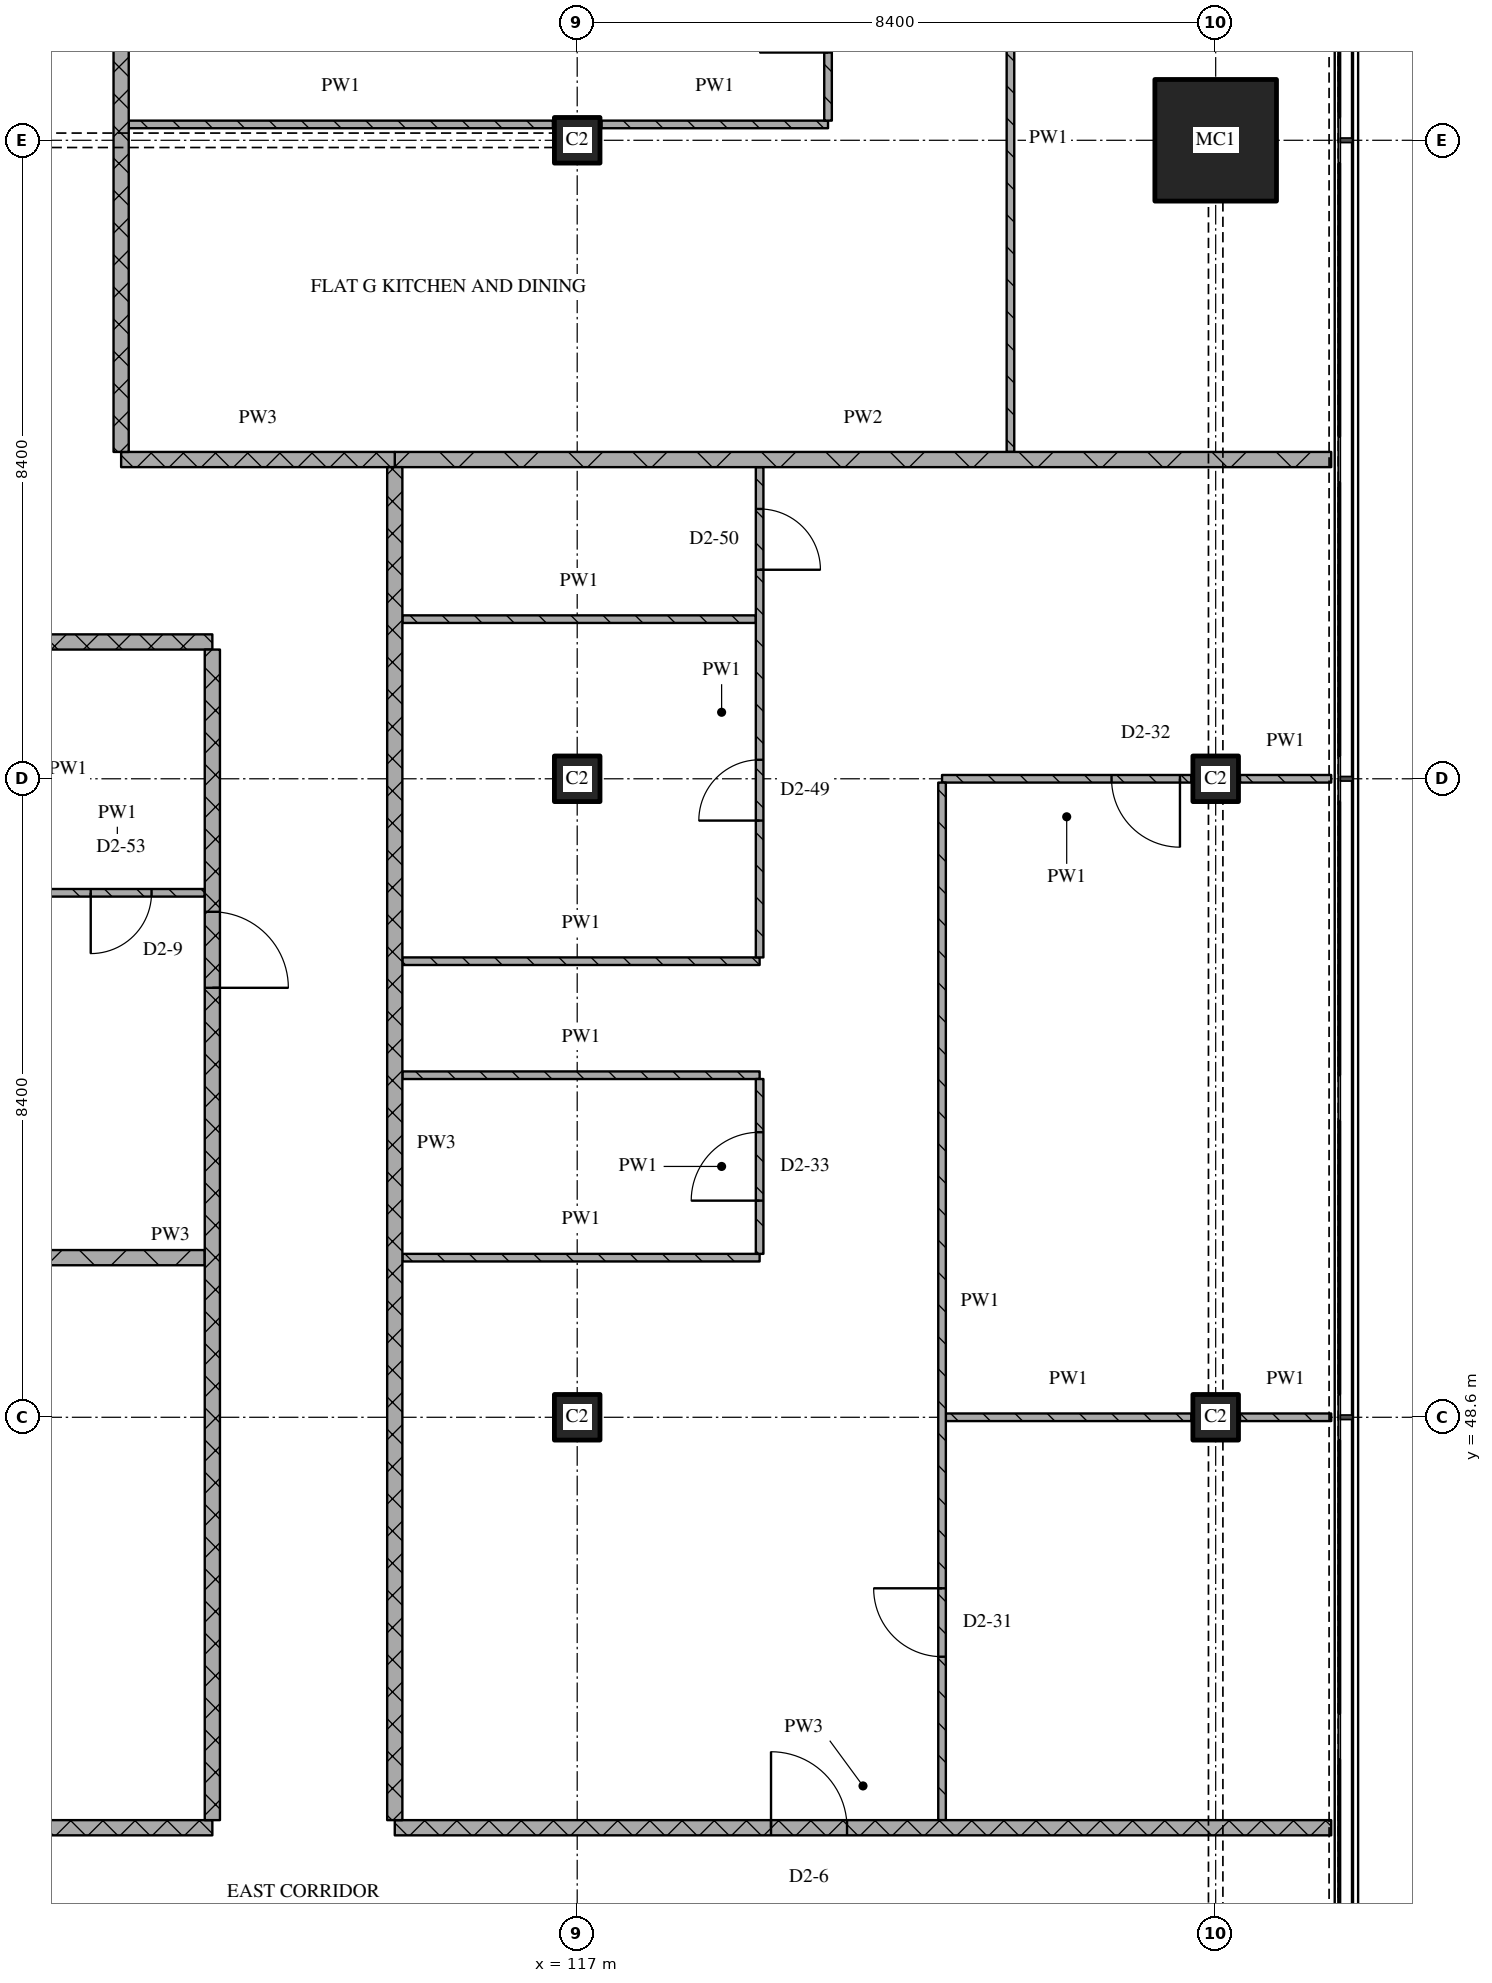
"""IFC4 building model, lengths in metres.
Left out: names, types, materials, properties, quantities, classifications, styles, units other than length and angle.
Written with IfcOpenShell. Run it as: python <this file> out.ifc"""

import sys

from ifc_helpers import new_model, si_unit, direction, frame, frame_2d, origin, origin_2d, place, context, subcontext, project, spatial, rectangle, extrude, element, fill, save


model = new_model("IFC4")
c1 = context("Model", 3, precision=1e-05, world=origin(), true_north=direction((0.0, 1.0)))
c2 = subcontext(c1, "Body", "Model", "MODEL_VIEW")
j1 = project(units=[si_unit("LENGTHUNIT", "METRE"), si_unit("PLANEANGLEUNIT", "RADIAN")], contexts=[c1])
p1 = place(None, origin())
s1 = spatial("IfcSite", under=j1, at=p1, CompositionType="ELEMENT")
p2 = place(p1, origin())
s2 = spatial("IfcBuilding", under=s1, at=p2, CompositionType="ELEMENT")
p3 = place(p2, frame((0.0, 0.0, 219.9)))
s3 = spatial("IfcBuildingStorey", under=s2, at=p3, CompositionType="ELEMENT", Elevation=219.9)
for number, where, z_axis, x_axis in (
    (1, (117.0, 48.6, 0.0), (0.0, 0.0, 1.0), (1.0, 0.0, 0.0)),
    (2, (117.0, 57.0, 0.0), (0.0, 0.0, 1.0), (1.0, 0.0, 0.0)),
    (3, (117.0, 65.4, 0.0), (0.0, 0.0, 1.0), (1.0, 0.0, 0.0)),
    (4, (125.4, 48.6, 0.0), (0.0, 0.0, 1.0), (1.0, 0.0, 0.0)),
    (5, (125.4, 57.0, 0.0), (0.0, 0.0, 1.0), (1.0, 0.0, 0.0)),
):
    element("IfcColumn", number, at=place(p3, frame(where, z_axis=z_axis, x_axis=x_axis)), inside=s3, PredefinedType="COLUMN", context=c2, shape_type="SweptSolid", body=[
        extrude(rectangle(XDim=0.6, YDim=0.6, at=origin_2d()), origin(), (0.0, 0.0, 1.0), 3.6),
    ])
p4 = place(p3, frame((125.4, 65.4, 0.0), z_axis=(0.0, 0.0, 1.0), x_axis=(1.0, 0.0, 0.0)))
e6 = element("IfcColumn", 6, at=p4, inside=s3, PredefinedType="COLUMN", context=c2, shape_type="SweptSolid", body=[
    extrude(rectangle(XDim=1.6, YDim=1.6, at=origin_2d()), origin(), (0.0, 0.0, 1.0), 3.6),
])
p5 = place(p3, frame((107.0, 43.2, 0.0), z_axis=(0.0, 0.0, 1.0), x_axis=(1.0, 0.0, 0.0)))
e7 = element("IfcWall", 7, at=p5, inside=s3, PredefinedType="PARTITIONING", context=c2, shape_type="SweptSolid", body=[
    extrude(rectangle(XDim=5.2, YDim=0.2, at=frame_2d((2.6, 0.0))), origin(), (0.0, 0.0, 1.0), 3.32),
])
p6 = place(p5, frame((2.15, 0.0, 0.0)))
e8 = element("IfcOpeningElement", 8, at=p6, cuts=e7, PredefinedType="OPENING", context=c2, shape_type="SweptSolid", body=[
    extrude(rectangle(XDim=0.9, YDim=2.1, at=frame_2d((0.45, 1.05))), frame((0.0, 0.11, 0.0), z_axis=(0.0, -1.0, 0.0), x_axis=(1.0, 0.0, 0.0)), (0.0, 0.0, 1.0), 0.22),
])
p7 = place(p3, frame((114.6, 43.2, 0.0), z_axis=(0.0, 0.0, 1.0), x_axis=(1.0, 0.0, 0.0)))
e9 = element("IfcWall", 9, at=p7, inside=s3, PredefinedType="PARTITIONING", context=c2, shape_type="SweptSolid", body=[
    extrude(rectangle(XDim=12.32, YDim=0.2, at=frame_2d((6.16, 0.0))), origin(), (0.0, 0.0, 1.0), 3.32),
])
p8 = place(p7, frame((4.95, 0.0, 0.0)))
e10 = element("IfcOpeningElement", 10, at=p8, cuts=e9, PredefinedType="OPENING", context=c2, shape_type="SweptSolid", body=[
    extrude(rectangle(XDim=1.0, YDim=2.1, at=frame_2d((0.5, 1.05))), frame((0.0, 0.11, 0.0), z_axis=(0.0, -1.0, 0.0), x_axis=(1.0, 0.0, 0.0)), (0.0, 0.0, 1.0), 0.22),
])
p9 = place(p3, frame((121.85, 48.6, 0.0), z_axis=(0.0, 0.0, 1.0), x_axis=(1.0, 0.0, 0.0)))
e11 = element("IfcWall", 11, at=p9, inside=s3, PredefinedType="PARTITIONING", context=c2, shape_type="SweptSolid", body=[
    extrude(rectangle(XDim=3.23, YDim=0.1, at=frame_2d((1.615, 0.0))), origin(), (0.0, 0.0, 1.0), 3.32),
])
p10 = place(p3, frame((125.72, 48.6, 0.0), z_axis=(0.0, 0.0, 1.0), x_axis=(1.0, 0.0, 0.0)))
e12 = element("IfcWall", 12, at=p10, inside=s3, PredefinedType="PARTITIONING", context=c2, shape_type="SweptSolid", body=[
    extrude(rectangle(XDim=1.2, YDim=0.1, at=frame_2d((0.6, 0.0))), origin(), (0.0, 0.0, 1.0), 3.32),
])
p11 = place(p3, frame((107.0, 50.7, 0.0), z_axis=(0.0, 0.0, 1.0), x_axis=(1.0, 0.0, 0.0)))
e13 = element("IfcWall", 13, at=p11, inside=s3, PredefinedType="PARTITIONING", context=c2, shape_type="SweptSolid", body=[
    extrude(rectangle(XDim=5.1, YDim=0.2, at=frame_2d((2.55, 0.0))), origin(), (0.0, 0.0, 1.0), 3.32),
])
for number, where, z_axis, x_axis in (
    (14, (114.7, 50.7, 0.0), (0.0, 0.0, 1.0), (1.0, 0.0, 0.0)),
    (15, (114.7, 53.1, 0.0), (0.0, 0.0, 1.0), (1.0, 0.0, 0.0)),
    (16, (114.7, 54.6, 0.0), (0.0, 0.0, 1.0), (1.0, 0.0, 0.0)),
):
    element("IfcWall", number, at=place(p3, frame(where, z_axis=z_axis, x_axis=x_axis)), inside=s3, PredefinedType="PARTITIONING", context=c2, shape_type="SweptSolid", body=[
        extrude(rectangle(XDim=4.7, YDim=0.1, at=frame_2d((2.35, 0.0))), origin(), (0.0, 0.0, 1.0), 3.32),
    ])
p12 = place(p3, frame((109.8, 55.5, 0.0), z_axis=(0.0, 0.0, 1.0), x_axis=(1.0, 0.0, 0.0)))
e17 = element("IfcWall", 17, at=p12, inside=s3, PredefinedType="PARTITIONING", context=c2, shape_type="SweptSolid", body=[
    extrude(rectangle(XDim=2.3, YDim=0.1, at=frame_2d((1.15, 0.0))), origin(), (0.0, 0.0, 1.0), 3.32),
])
p13 = place(p12, frame((0.8, 0.0, 0.0)))
e18 = element("IfcOpeningElement", 18, at=p13, cuts=e17, PredefinedType="OPENING", context=c2, shape_type="SweptSolid", body=[
    extrude(rectangle(XDim=0.8, YDim=2.1, at=frame_2d((0.4, 1.05))), frame((0.0, 0.06, 0.0), z_axis=(0.0, -1.0, 0.0), x_axis=(1.0, 0.0, 0.0)), (0.0, 0.0, 1.0), 0.12),
])
p14 = place(p3, frame((125.08, 57.0, 0.0), z_axis=(0.0, 0.0, 1.0), x_axis=(-1.0, 0.0, 0.0)))
e19 = element("IfcWall", 19, at=p14, inside=s3, PredefinedType="PARTITIONING", context=c2, shape_type="SweptSolid", body=[
    extrude(rectangle(XDim=3.28, YDim=0.1, at=frame_2d((1.64, 0.0))), origin(), (0.0, 0.0, 1.0), 3.32),
])
p15 = place(p14, frame((0.15, 0.0, 0.0)))
e20 = element("IfcOpeningElement", 20, at=p15, cuts=e19, PredefinedType="OPENING", context=c2, shape_type="SweptSolid", body=[
    extrude(rectangle(XDim=0.9, YDim=2.1, at=frame_2d((0.45, 1.05))), frame((0.0, 0.06, 0.0), z_axis=(0.0, -1.0, 0.0), x_axis=(1.0, 0.0, 0.0)), (0.0, 0.0, 1.0), 0.12),
])
p16 = place(p3, frame((125.72, 57.0, 0.0), z_axis=(0.0, 0.0, 1.0), x_axis=(1.0, 0.0, 0.0)))
e21 = element("IfcWall", 21, at=p16, inside=s3, PredefinedType="PARTITIONING", context=c2, shape_type="SweptSolid", body=[
    extrude(rectangle(XDim=1.2, YDim=0.1, at=frame_2d((0.6, 0.0))), origin(), (0.0, 0.0, 1.0), 3.32),
])
p17 = place(p3, frame((101.4, 58.8, 0.0), z_axis=(0.0, 0.0, 1.0), x_axis=(1.0, 0.0, 0.0)))
e22 = element("IfcWall", 22, at=p17, inside=s3, PredefinedType="PARTITIONING", context=c2, shape_type="SweptSolid", body=[
    extrude(rectangle(XDim=10.8, YDim=0.2, at=frame_2d((5.4, 0.0))), origin(), (0.0, 0.0, 1.0), 3.32),
])
p18 = place(p3, frame((114.7, 59.1, 0.0), z_axis=(0.0, 0.0, 1.0), x_axis=(1.0, 0.0, 0.0)))
e23 = element("IfcWall", 23, at=p18, inside=s3, PredefinedType="PARTITIONING", context=c2, shape_type="SweptSolid", body=[
    extrude(rectangle(XDim=4.65, YDim=0.1, at=frame_2d((2.325, 0.0))), origin(), (0.0, 0.0, 1.0), 3.32),
])
p19 = place(p3, frame((111.0, 61.2, 0.0), z_axis=(0.0, 0.0, 1.0), x_axis=(1.0, 0.0, 0.0)))
e24 = element("IfcWall", 24, at=p19, inside=s3, PredefinedType="PARTITIONING", context=c2, shape_type="SweptSolid", body=[
    extrude(rectangle(XDim=3.6, YDim=0.2, at=frame_2d((1.8, 0.0))), origin(), (0.0, 0.0, 1.0), 3.32),
])
p20 = place(p3, frame((114.6, 61.2, 0.0), z_axis=(0.0, 0.0, 1.0), x_axis=(1.0, 0.0, 0.0)))
e25 = element("IfcWall", 25, at=p20, inside=s3, PredefinedType="PARTITIONING", context=c2, shape_type="SweptSolid", body=[
    extrude(rectangle(XDim=12.32, YDim=0.2, at=frame_2d((6.16, 0.0))), origin(), (0.0, 0.0, 1.0), 3.32),
])
p21 = place(p3, frame((111.1, 65.609, 0.0), z_axis=(0.0, 0.0, 1.0), x_axis=(1.0, 0.0, 0.0)))
e26 = element("IfcWall", 26, at=p21, inside=s3, PredefinedType="PARTITIONING", context=c2, shape_type="SweptSolid", body=[
    extrude(rectangle(XDim=5.58, YDim=0.1, at=frame_2d((2.79, 0.0))), origin(), (0.0, 0.0, 1.0), 3.32),
])
p22 = place(p3, frame((117.32, 65.609, 0.0), z_axis=(0.0, 0.0, 1.0), x_axis=(1.0, 0.0, 0.0)))
e27 = element("IfcWall", 27, at=p22, inside=s3, PredefinedType="PARTITIONING", context=c2, shape_type="SweptSolid", body=[
    extrude(rectangle(XDim=2.98, YDim=0.1, at=frame_2d((1.49, 0.0))), origin(), (0.0, 0.0, 1.0), 3.32),
])
p23 = place(p3, frame((111.0, 75.32, 0.0), z_axis=(0.0, 0.0, 1.0), x_axis=(0.0, -1.0, 0.0)))
e28 = element("IfcWall", 28, at=p23, inside=s3, PredefinedType="PARTITIONING", context=c2, shape_type="SweptSolid", body=[
    extrude(rectangle(XDim=14.02, YDim=0.2, at=frame_2d((7.01, 0.0))), origin(), (0.0, 0.0, 1.0), 3.32),
])
p24 = place(p23, frame((5.67, 0.0, 0.0)))
e29 = element("IfcOpeningElement", 29, at=p24, cuts=e28, PredefinedType="OPENING", context=c2, shape_type="SweptSolid", body=[
    extrude(rectangle(XDim=1.0, YDim=2.1, at=frame_2d((0.5, 1.05))), frame((0.0, 0.11, 0.0), z_axis=(0.0, -1.0, 0.0), x_axis=(1.0, 0.0, 0.0)), (0.0, 0.0, 1.0), 0.22),
])
p25 = place(p3, frame((112.2, 43.3, 0.0), z_axis=(0.0, 0.0, 1.0), x_axis=(0.0, 1.0, 0.0)))
e30 = element("IfcWall", 30, at=p25, inside=s3, PredefinedType="PARTITIONING", context=c2, shape_type="SweptSolid", body=[
    extrude(rectangle(XDim=15.4, YDim=0.2, at=frame_2d((7.7, 0.0))), origin(), (0.0, 0.0, 1.0), 3.32),
])
p26 = place(p25, frame((10.95, 0.0, 0.0)))
e31 = element("IfcOpeningElement", 31, at=p26, cuts=e30, PredefinedType="OPENING", context=c2, shape_type="SweptSolid", body=[
    extrude(rectangle(XDim=1.0, YDim=2.1, at=frame_2d((0.5, 1.05))), frame((0.0, 0.11, 0.0), z_axis=(0.0, -1.0, 0.0), x_axis=(1.0, 0.0, 0.0)), (0.0, 0.0, 1.0), 0.22),
])
p27 = place(p3, frame((114.6, 61.1, 0.0), z_axis=(0.0, 0.0, 1.0), x_axis=(0.0, -1.0, 0.0)))
e32 = element("IfcWall", 32, at=p27, inside=s3, PredefinedType="PARTITIONING", context=c2, shape_type="SweptSolid", body=[
    extrude(rectangle(XDim=17.8, YDim=0.2, at=frame_2d((8.9, 0.0))), origin(), (0.0, 0.0, 1.0), 3.32),
])
p28 = place(p3, frame((119.4, 50.75, 0.0), z_axis=(0.0, 0.0, 1.0), x_axis=(0.0, 1.0, 0.0)))
e33 = element("IfcWall", 33, at=p28, inside=s3, PredefinedType="PARTITIONING", context=c2, shape_type="SweptSolid", body=[
    extrude(rectangle(XDim=2.3, YDim=0.1, at=frame_2d((1.15, 0.0))), origin(), (0.0, 0.0, 1.0), 3.32),
])
p29 = place(p28, frame((0.7, 0.0, 0.0)))
e34 = element("IfcOpeningElement", 34, at=p29, cuts=e33, PredefinedType="OPENING", context=c2, shape_type="SweptSolid", body=[
    extrude(rectangle(XDim=0.9, YDim=2.1, at=frame_2d((0.45, 1.05))), frame((0.0, 0.06, 0.0), z_axis=(0.0, -1.0, 0.0), x_axis=(1.0, 0.0, 0.0)), (0.0, 0.0, 1.0), 0.12),
])
p30 = place(p3, frame((119.4, 54.65, 0.0), z_axis=(0.0, 0.0, 1.0), x_axis=(0.0, 1.0, 0.0)))
e35 = element("IfcWall", 35, at=p30, inside=s3, PredefinedType="PARTITIONING", context=c2, shape_type="SweptSolid", body=[
    extrude(rectangle(XDim=6.45, YDim=0.1, at=frame_2d((3.225, 0.0))), origin(), (0.0, 0.0, 1.0), 3.32),
])
p31 = place(p30, frame((1.8, 0.0, 0.0)))
e36 = element("IfcOpeningElement", 36, at=p31, cuts=e35, PredefinedType="OPENING", context=c2, shape_type="SweptSolid", body=[
    extrude(rectangle(XDim=0.8, YDim=2.1, at=frame_2d((0.4, 1.05))), frame((0.0, 0.06, 0.0), z_axis=(0.0, -1.0, 0.0), x_axis=(1.0, 0.0, 0.0)), (0.0, 0.0, 1.0), 0.12),
])
p32 = place(p30, frame((5.1, 0.0, 0.0)))
e37 = element("IfcOpeningElement", 37, at=p32, cuts=e35, PredefinedType="OPENING", context=c2, shape_type="SweptSolid", body=[
    extrude(rectangle(XDim=0.8, YDim=2.1, at=frame_2d((0.4, 1.05))), frame((0.0, 0.06, 0.0), z_axis=(0.0, -1.0, 0.0), x_axis=(1.0, 0.0, 0.0)), (0.0, 0.0, 1.0), 0.12),
])
p33 = place(p3, frame((120.3, 65.659, 0.0), z_axis=(0.0, 0.0, 1.0), x_axis=(0.0, 1.0, 0.0)))
e38 = element("IfcWall", 38, at=p33, inside=s3, PredefinedType="PARTITIONING", context=c2, shape_type="SweptSolid", body=[
    extrude(rectangle(XDim=2.691, YDim=0.1, at=frame_2d((1.346, 0.0))), origin(), (0.0, 0.0, 1.0), 3.32),
])
p34 = place(p33, frame((0.896, 0.0, 0.0)))
e39 = element("IfcOpeningElement", 39, at=p34, cuts=e38, PredefinedType="OPENING", context=c2, shape_type="SweptSolid", body=[
    extrude(rectangle(XDim=0.9, YDim=2.1, at=frame_2d((0.45, 1.05))), frame((0.0, 0.06, 0.0), z_axis=(0.0, -1.0, 0.0), x_axis=(1.0, 0.0, 0.0)), (0.0, 0.0, 1.0), 0.12),
])
p35 = place(p3, frame((121.8, 56.95, 0.0), z_axis=(0.0, 0.0, 1.0), x_axis=(0.0, -1.0, 0.0)))
e40 = element("IfcWall", 40, at=p35, inside=s3, PredefinedType="PARTITIONING", context=c2, shape_type="SweptSolid", body=[
    extrude(rectangle(XDim=13.65, YDim=0.1, at=frame_2d((6.825, 0.0))), origin(), (0.0, 0.0, 1.0), 3.32),
])
p36 = place(p35, frame((10.6, 0.0, 0.0)))
e41 = element("IfcOpeningElement", 41, at=p36, cuts=e40, PredefinedType="OPENING", context=c2, shape_type="SweptSolid", body=[
    extrude(rectangle(XDim=0.9, YDim=2.1, at=frame_2d((0.45, 1.05))), frame((0.0, 0.06, 0.0), z_axis=(0.0, -1.0, 0.0), x_axis=(1.0, 0.0, 0.0)), (0.0, 0.0, 1.0), 0.12),
])
p37 = place(p3, frame((122.7, 69.55, 0.0), z_axis=(0.0, 0.0, 1.0), x_axis=(0.0, -1.0, 0.0)))
e42 = element("IfcWall", 42, at=p37, inside=s3, PredefinedType="PARTITIONING", context=c2, shape_type="SweptSolid", body=[
    extrude(rectangle(XDim=8.25, YDim=0.1, at=frame_2d((4.125, 0.0))), origin(), (0.0, 0.0, 1.0), 3.32),
])
p38 = place(p8, origin())
e43 = element("IfcDoor", 43, at=p38, inside=s3, OperationType="SINGLE_SWING_LEFT", PredefinedType="DOOR", context=c2, shape_type="SweptSolid", body=[
    extrude(rectangle(XDim=1.0, YDim=2.1, at=frame_2d((0.5, 1.05))), frame((0.0, 0.025, 0.0), z_axis=(0.0, -1.0, 0.0), x_axis=(1.0, 0.0, 0.0)), (0.0, 0.0, 1.0), 0.05),
])
fill(e10, e43)
p39 = place(p13, origin())
e44 = element("IfcDoor", 44, at=p39, inside=s3, OperationType="SINGLE_SWING_RIGHT", PredefinedType="DOOR", context=c2, shape_type="SweptSolid", body=[
    extrude(rectangle(XDim=0.8, YDim=2.1, at=frame_2d((0.4, 1.05))), frame((0.0, 0.025, 0.0), z_axis=(0.0, -1.0, 0.0), x_axis=(1.0, 0.0, 0.0)), (0.0, 0.0, 1.0), 0.05),
])
fill(e18, e44)
p40 = place(p15, origin())
e45 = element("IfcDoor", 45, at=p40, inside=s3, OperationType="SINGLE_SWING_LEFT", PredefinedType="DOOR", context=c2, shape_type="SweptSolid", body=[
    extrude(rectangle(XDim=0.9, YDim=2.1, at=frame_2d((0.45, 1.05))), frame((0.0, 0.025, 0.0), z_axis=(0.0, -1.0, 0.0), x_axis=(1.0, 0.0, 0.0)), (0.0, 0.0, 1.0), 0.05),
])
fill(e20, e45)
p41 = place(p26, origin())
e46 = element("IfcDoor", 46, at=p41, inside=s3, OperationType="SINGLE_SWING_RIGHT", PredefinedType="DOOR", context=c2, shape_type="SweptSolid", body=[
    extrude(rectangle(XDim=1.0, YDim=2.1, at=frame_2d((0.5, 1.05))), frame((0.0, 0.025, 0.0), z_axis=(0.0, -1.0, 0.0), x_axis=(1.0, 0.0, 0.0)), (0.0, 0.0, 1.0), 0.05),
])
fill(e31, e46)
p42 = place(p29, origin())
e47 = element("IfcDoor", 47, at=p42, inside=s3, OperationType="SINGLE_SWING_LEFT", PredefinedType="DOOR", context=c2, shape_type="SweptSolid", body=[
    extrude(rectangle(XDim=0.9, YDim=2.1, at=frame_2d((0.45, 1.05))), frame((0.0, 0.025, 0.0), z_axis=(0.0, -1.0, 0.0), x_axis=(1.0, 0.0, 0.0)), (0.0, 0.0, 1.0), 0.05),
])
fill(e34, e47)
p43 = place(p31, origin())
e48 = element("IfcDoor", 48, at=p43, inside=s3, OperationType="SINGLE_SWING_LEFT", PredefinedType="DOOR", context=c2, shape_type="SweptSolid", body=[
    extrude(rectangle(XDim=0.8, YDim=2.1, at=frame_2d((0.4, 1.05))), frame((0.0, 0.025, 0.0), z_axis=(0.0, -1.0, 0.0), x_axis=(1.0, 0.0, 0.0)), (0.0, 0.0, 1.0), 0.05),
])
fill(e36, e48)
p44 = place(p32, origin())
e49 = element("IfcDoor", 49, at=p44, inside=s3, OperationType="SINGLE_SWING_RIGHT", PredefinedType="DOOR", context=c2, shape_type="SweptSolid", body=[
    extrude(rectangle(XDim=0.8, YDim=2.1, at=frame_2d((0.4, 1.05))), frame((0.0, 0.025, 0.0), z_axis=(0.0, -1.0, 0.0), x_axis=(1.0, 0.0, 0.0)), (0.0, 0.0, 1.0), 0.05),
])
fill(e37, e49)
p45 = place(p34, origin())
e50 = element("IfcDoor", 50, at=p45, inside=s3, OperationType="SINGLE_SWING_LEFT", PredefinedType="DOOR", context=c2, shape_type="SweptSolid", body=[
    extrude(rectangle(XDim=0.9, YDim=2.1, at=frame_2d((0.45, 1.05))), frame((0.0, 0.025, 0.0), z_axis=(0.0, -1.0, 0.0), x_axis=(1.0, 0.0, 0.0)), (0.0, 0.0, 1.0), 0.05),
])
fill(e39, e50)
p46 = place(p36, origin())
e51 = element("IfcDoor", 51, at=p46, inside=s3, OperationType="SINGLE_SWING_RIGHT", PredefinedType="DOOR", context=c2, shape_type="SweptSolid", body=[
    extrude(rectangle(XDim=0.9, YDim=2.1, at=frame_2d((0.45, 1.05))), frame((0.0, 0.025, 0.0), z_axis=(0.0, -1.0, 0.0), x_axis=(1.0, 0.0, 0.0)), (0.0, 0.0, 1.0), 0.05),
])
fill(e41, e51)
save(model, sys.argv[1])
